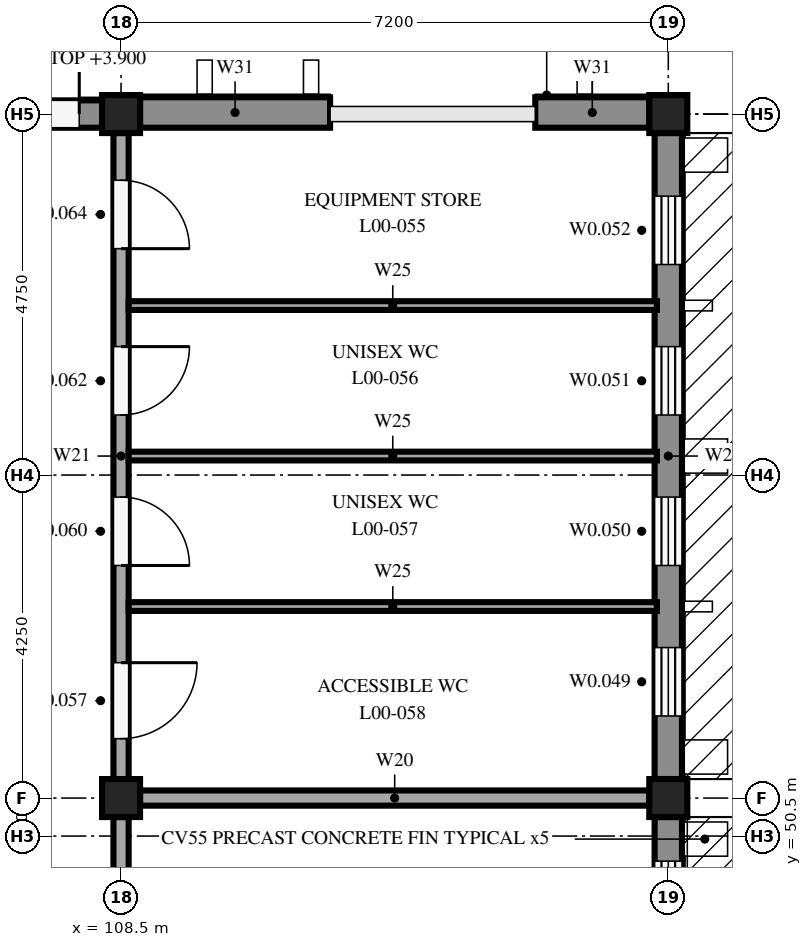
"""IFC4 building model, lengths in metres.
Left out: names, types, materials, properties, quantities, classifications, styles, units other than length and angle.
Written with IfcOpenShell. Run it as: python <this file> out.ifc"""

import sys

from ifc_helpers import new_model, si_unit, direction, frame, frame_2d, origin, origin_2d, place, context, subcontext, project, spatial, rectangle, extrude, element, fill, save


model = new_model("IFC4")
c1 = context("Model", 3, precision=1e-05, world=origin(), true_north=direction((0.0, 1.0)))
c2 = subcontext(c1, "Body", "Model", "MODEL_VIEW")
j1 = project(units=[si_unit("LENGTHUNIT", "METRE"), si_unit("PLANEANGLEUNIT", "RADIAN")], contexts=[c1])
p1 = place(None, origin())
s1 = spatial("IfcSite", under=j1, at=p1, CompositionType="ELEMENT")
p2 = place(p1, origin())
s2 = spatial("IfcBuilding", under=s1, at=p2, CompositionType="ELEMENT")
p3 = place(p2, origin())
s3 = spatial("IfcBuildingStorey", under=s2, at=p3, CompositionType="ELEMENT", Elevation=0.0)
for number, where, z_axis, x_axis in (
    (1, (108.5, 51.0, 0.0), (0.0, 0.0, 1.0), (1.0, 0.0, 0.0)),
    (2, (108.5, 60.0, 0.0), (0.0, 0.0, 1.0), (1.0, 0.0, 0.0)),
    (3, (115.7, 51.0, 0.0), (0.0, 0.0, 1.0), (1.0, 0.0, 0.0)),
    (4, (115.7, 60.0, 0.0), (0.0, 0.0, 1.0), (1.0, 0.0, 0.0)),
):
    element("IfcColumn", number, at=place(p3, frame(where, z_axis=z_axis, x_axis=x_axis)), inside=s3, PredefinedType="COLUMN", context=c2, shape_type="SweptSolid", body=[
        extrude(rectangle(XDim=0.5, YDim=0.5, at=origin_2d()), origin(), (0.0, 0.0, 1.0), 4.25),
    ])
p4 = place(p3, frame((115.7, 50.75, 0.0), z_axis=(0.0, 0.0, 1.0), x_axis=(0.0, -1.0, 0.0)))
e5 = element("IfcWall", 5, at=p4, inside=s3, PredefinedType="STANDARD", context=c2, shape_type="SweptSolid", body=[
    extrude(rectangle(XDim=8.5, YDim=0.36, at=frame_2d((4.25, 0.0))), origin(), (0.0, 0.0, 1.0), 3.75),
])
p5 = place(p4, frame((6.52, 0.0, 0.6)))
e6 = element("IfcOpeningElement", 6, at=p5, cuts=e5, PredefinedType="OPENING", context=c2, shape_type="SweptSolid", body=[
    extrude(rectangle(XDim=1.4, YDim=3.0, at=frame_2d((0.7, 1.5))), frame((0.0, 0.19, 0.0), z_axis=(0.0, -1.0, 0.0), x_axis=(1.0, 0.0, 0.0)), (0.0, 0.0, 1.0), 0.38),
])
p6 = place(p4, frame((4.54, 0.0, 0.6)))
e7 = element("IfcOpeningElement", 7, at=p6, cuts=e5, PredefinedType="OPENING", context=c2, shape_type="SweptSolid", body=[
    extrude(rectangle(XDim=1.4, YDim=3.0, at=frame_2d((0.7, 1.5))), frame((0.0, 0.19, 0.0), z_axis=(0.0, -1.0, 0.0), x_axis=(1.0, 0.0, 0.0)), (0.0, 0.0, 1.0), 0.38),
])
p7 = place(p4, frame((2.56, 0.0, 0.6)))
e8 = element("IfcOpeningElement", 8, at=p7, cuts=e5, PredefinedType="OPENING", context=c2, shape_type="SweptSolid", body=[
    extrude(rectangle(XDim=1.4, YDim=3.0, at=frame_2d((0.7, 1.5))), frame((0.0, 0.19, 0.0), z_axis=(0.0, -1.0, 0.0), x_axis=(1.0, 0.0, 0.0)), (0.0, 0.0, 1.0), 0.38),
])
p8 = place(p4, frame((0.58, 0.0, 0.6)))
e9 = element("IfcOpeningElement", 9, at=p8, cuts=e5, PredefinedType="OPENING", context=c2, shape_type="SweptSolid", body=[
    extrude(rectangle(XDim=1.4, YDim=3.0, at=frame_2d((0.7, 1.5))), frame((0.0, 0.19, 0.0), z_axis=(0.0, -1.0, 0.0), x_axis=(1.0, 0.0, 0.0)), (0.0, 0.0, 1.0), 0.38),
])
p9 = place(p3, frame((115.7, 59.75, 0.0), z_axis=(0.0, 0.0, 1.0), x_axis=(0.0, -1.0, 0.0)))
e10 = element("IfcWall", 10, at=p9, inside=s3, PredefinedType="STANDARD", context=c2, shape_type="SweptSolid", body=[
    extrude(rectangle(XDim=8.5, YDim=0.36, at=frame_2d((4.25, 0.0))), origin(), (0.0, 0.0, 1.0), 3.75),
])
p10 = place(p9, frame((6.77, 0.0, 1.6)))
e11 = element("IfcOpeningElement", 11, at=p10, cuts=e10, PredefinedType="OPENING", context=c2, shape_type="SweptSolid", body=[
    extrude(rectangle(XDim=0.9, YDim=1.0, at=frame_2d((0.45, 0.5))), frame((0.0, 0.19, 0.0), z_axis=(0.0, -1.0, 0.0), x_axis=(1.0, 0.0, 0.0)), (0.0, 0.0, 1.0), 0.38),
])
p11 = place(p9, frame((4.79, 0.0, 1.6)))
e12 = element("IfcOpeningElement", 12, at=p11, cuts=e10, PredefinedType="OPENING", context=c2, shape_type="SweptSolid", body=[
    extrude(rectangle(XDim=0.9, YDim=1.0, at=frame_2d((0.45, 0.5))), frame((0.0, 0.19, 0.0), z_axis=(0.0, -1.0, 0.0), x_axis=(1.0, 0.0, 0.0)), (0.0, 0.0, 1.0), 0.38),
])
p12 = place(p9, frame((2.81, 0.0, 1.6)))
e13 = element("IfcOpeningElement", 13, at=p12, cuts=e10, PredefinedType="OPENING", context=c2, shape_type="SweptSolid", body=[
    extrude(rectangle(XDim=0.9, YDim=1.0, at=frame_2d((0.45, 0.5))), frame((0.0, 0.19, 0.0), z_axis=(0.0, -1.0, 0.0), x_axis=(1.0, 0.0, 0.0)), (0.0, 0.0, 1.0), 0.38),
])
p13 = place(p9, frame((0.83, 0.0, 1.6)))
e14 = element("IfcOpeningElement", 14, at=p13, cuts=e10, PredefinedType="OPENING", context=c2, shape_type="SweptSolid", body=[
    extrude(rectangle(XDim=0.9, YDim=1.0, at=frame_2d((0.45, 0.5))), frame((0.0, 0.19, 0.0), z_axis=(0.0, -1.0, 0.0), x_axis=(1.0, 0.0, 0.0)), (0.0, 0.0, 1.0), 0.38),
])
p14 = place(p3, frame((106.05, 60.0, 0.0), z_axis=(0.0, 0.0, 1.0), x_axis=(1.0, 0.0, 0.0)))
e15 = element("IfcWall", 15, at=p14, inside=s3, PredefinedType="STANDARD", context=c2, shape_type="SweptSolid", body=[
    extrude(rectangle(XDim=2.2, YDim=0.36, at=frame_2d((1.1, 0.0))), origin(), (0.0, 0.0, 1.0), 3.9),
])
p15 = place(p14, frame((0.3, 0.0, 0.0)))
e16 = element("IfcOpeningElement", 16, at=p15, cuts=e15, PredefinedType="OPENING", context=c2, shape_type="SweptSolid", body=[
    extrude(rectangle(XDim=1.6, YDim=2.1, at=frame_2d((0.8, 1.05))), frame((0.0, 0.19, 0.0), z_axis=(0.0, -1.0, 0.0), x_axis=(1.0, 0.0, 0.0)), (0.0, 0.0, 1.0), 0.38),
])
p16 = place(p3, frame((108.75, 60.02, 0.0), z_axis=(0.0, 0.0, 1.0), x_axis=(1.0, 0.0, 0.0)))
e17 = element("IfcWall", 17, at=p16, inside=s3, PredefinedType="STANDARD", context=c2, shape_type="SweptSolid", body=[
    extrude(rectangle(XDim=2.5, YDim=0.4, at=frame_2d((1.25, 0.0))), origin(), (0.0, 0.0, 1.0), 3.8),
])
p17 = place(p3, frame((113.95, 60.02, 0.0), z_axis=(0.0, 0.0, 1.0), x_axis=(1.0, 0.0, 0.0)))
e18 = element("IfcWall", 18, at=p17, inside=s3, PredefinedType="STANDARD", context=c2, shape_type="SweptSolid", body=[
    extrude(rectangle(XDim=1.5, YDim=0.4, at=frame_2d((0.75, 0.0))), origin(), (0.0, 0.0, 1.0), 3.8),
])
p18 = place(p3, frame((108.5, 59.75, 0.0), z_axis=(0.0, 0.0, 1.0), x_axis=(0.0, -1.0, 0.0)))
e19 = element("IfcWall", 19, at=p18, inside=s3, PredefinedType="PARTITIONING", context=c2, shape_type="SweptSolid", body=[
    extrude(rectangle(XDim=8.5, YDim=0.2, at=frame_2d((4.25, 0.0))), origin(), (0.0, 0.0, 1.0), 3.8),
])
p19 = place(p18, frame((6.969, 0.0, 0.0)))
e20 = element("IfcOpeningElement", 20, at=p19, cuts=e19, PredefinedType="OPENING", context=c2, shape_type="SweptSolid", body=[
    extrude(rectangle(XDim=1.0, YDim=2.1, at=frame_2d((0.5, 1.05))), frame((0.0, 0.11, 0.0), z_axis=(0.0, -1.0, 0.0), x_axis=(1.0, 0.0, 0.0)), (0.0, 0.0, 1.0), 0.22),
])
p20 = place(p18, frame((4.79, 0.0, 0.0)))
e21 = element("IfcOpeningElement", 21, at=p20, cuts=e19, PredefinedType="OPENING", context=c2, shape_type="SweptSolid", body=[
    extrude(rectangle(XDim=0.9, YDim=2.1, at=frame_2d((0.45, 1.05))), frame((0.0, 0.11, 0.0), z_axis=(0.0, -1.0, 0.0), x_axis=(1.0, 0.0, 0.0)), (0.0, 0.0, 1.0), 0.22),
])
p21 = place(p18, frame((2.81, 0.0, 0.0)))
e22 = element("IfcOpeningElement", 22, at=p21, cuts=e19, PredefinedType="OPENING", context=c2, shape_type="SweptSolid", body=[
    extrude(rectangle(XDim=0.9, YDim=2.1, at=frame_2d((0.45, 1.05))), frame((0.0, 0.11, 0.0), z_axis=(0.0, -1.0, 0.0), x_axis=(1.0, 0.0, 0.0)), (0.0, 0.0, 1.0), 0.22),
])
p22 = place(p18, frame((0.621, 0.0, 0.0)))
e23 = element("IfcOpeningElement", 23, at=p22, cuts=e19, PredefinedType="OPENING", context=c2, shape_type="SweptSolid", body=[
    extrude(rectangle(XDim=0.9, YDim=2.1, at=frame_2d((0.45, 1.05))), frame((0.0, 0.11, 0.0), z_axis=(0.0, -1.0, 0.0), x_axis=(1.0, 0.0, 0.0)), (0.0, 0.0, 1.0), 0.22),
])
p23 = place(p3, frame((108.75, 51.0, 0.0), z_axis=(0.0, 0.0, 1.0), x_axis=(1.0, 0.0, 0.0)))
e24 = element("IfcWall", 24, at=p23, inside=s3, PredefinedType="PARTITIONING", context=c2, shape_type="SweptSolid", body=[
    extrude(rectangle(XDim=6.7, YDim=0.2, at=frame_2d((3.35, 0.0))), origin(), (0.0, 0.0, 1.0), 3.8),
])
for number, where, z_axis, x_axis in (
    (25, (108.6, 57.48, 0.0), (0.0, 0.0, 1.0), (1.0, 0.0, 0.0)),
    (26, (108.6, 55.5, 0.0), (0.0, 0.0, 1.0), (1.0, 0.0, 0.0)),
    (27, (108.6, 53.52, 0.0), (0.0, 0.0, 1.0), (1.0, 0.0, 0.0)),
):
    element("IfcWall", number, at=place(p3, frame(where, z_axis=z_axis, x_axis=x_axis)), inside=s3, PredefinedType="PARTITIONING", context=c2, shape_type="SweptSolid", body=[
        extrude(rectangle(XDim=6.95, YDim=0.115, at=frame_2d((3.475, 0.0))), origin(), (0.0, 0.0, 1.0), 4.25),
    ])
p24 = place(p3, frame((108.5, 50.75, 0.0), z_axis=(0.0, 0.0, 1.0), x_axis=(0.0, -1.0, 0.0)))
e28 = element("IfcWall", 28, at=p24, inside=s3, PredefinedType="PARTITIONING", context=c2, shape_type="SweptSolid", body=[
    extrude(rectangle(XDim=8.5, YDim=0.2, at=frame_2d((4.25, 0.0))), origin(), (0.0, 0.0, 1.0), 3.8),
])
p25 = place(p24, frame((3.75, 0.0, 0.0)))
e29 = element("IfcOpeningElement", 29, at=p25, cuts=e28, PredefinedType="OPENING", context=c2, shape_type="SweptSolid", body=[
    extrude(rectangle(XDim=1.0, YDim=2.1, at=frame_2d((0.5, 1.05))), frame((0.0, 0.11, 0.0), z_axis=(0.0, -1.0, 0.0), x_axis=(1.0, 0.0, 0.0)), (0.0, 0.0, 1.0), 0.22),
])
p26 = place(p8, origin())
e30 = element("IfcWindow", 30, at=p26, inside=s3, PartitioningType="DOUBLE_PANEL_VERTICAL", PredefinedType="WINDOW", context=c2, shape_type="SweptSolid", body=[
    extrude(rectangle(XDim=1.4, YDim=3.0, at=frame_2d((0.7, 1.5))), frame((0.0, 0.03, 0.0), z_axis=(0.0, -1.0, 0.0), x_axis=(1.0, 0.0, 0.0)), (0.0, 0.0, 1.0), 0.06),
])
fill(e9, e30)
p27 = place(p10, origin())
e31 = element("IfcWindow", 31, at=p27, inside=s3, PartitioningType="SINGLE_PANEL", PredefinedType="WINDOW", context=c2, shape_type="SweptSolid", body=[
    extrude(rectangle(XDim=0.9, YDim=1.0, at=frame_2d((0.45, 0.5))), frame((0.0, 0.03, 0.0), z_axis=(0.0, -1.0, 0.0), x_axis=(1.0, 0.0, 0.0)), (0.0, 0.0, 1.0), 0.06),
])
fill(e11, e31)
p28 = place(p11, origin())
e32 = element("IfcWindow", 32, at=p28, inside=s3, PartitioningType="SINGLE_PANEL", PredefinedType="WINDOW", context=c2, shape_type="SweptSolid", body=[
    extrude(rectangle(XDim=0.9, YDim=1.0, at=frame_2d((0.45, 0.5))), frame((0.0, 0.03, 0.0), z_axis=(0.0, -1.0, 0.0), x_axis=(1.0, 0.0, 0.0)), (0.0, 0.0, 1.0), 0.06),
])
fill(e12, e32)
p29 = place(p12, origin())
e33 = element("IfcWindow", 33, at=p29, inside=s3, PartitioningType="SINGLE_PANEL", PredefinedType="WINDOW", context=c2, shape_type="SweptSolid", body=[
    extrude(rectangle(XDim=0.9, YDim=1.0, at=frame_2d((0.45, 0.5))), frame((0.0, 0.03, 0.0), z_axis=(0.0, -1.0, 0.0), x_axis=(1.0, 0.0, 0.0)), (0.0, 0.0, 1.0), 0.06),
])
fill(e13, e33)
p30 = place(p13, origin())
e34 = element("IfcWindow", 34, at=p30, inside=s3, PartitioningType="SINGLE_PANEL", PredefinedType="WINDOW", context=c2, shape_type="SweptSolid", body=[
    extrude(rectangle(XDim=0.9, YDim=1.0, at=frame_2d((0.45, 0.5))), frame((0.0, 0.03, 0.0), z_axis=(0.0, -1.0, 0.0), x_axis=(1.0, 0.0, 0.0)), (0.0, 0.0, 1.0), 0.06),
])
fill(e14, e34)
p31 = place(p15, origin())
e35 = element("IfcDoor", 35, at=p31, inside=s3, OperationType="DOUBLE_DOOR_SINGLE_SWING", PredefinedType="DOOR", context=c2, shape_type="SweptSolid", body=[
    extrude(rectangle(XDim=1.6, YDim=2.1, at=frame_2d((0.8, 1.05))), frame((0.0, 0.025, 0.0), z_axis=(0.0, -1.0, 0.0), x_axis=(1.0, 0.0, 0.0)), (0.0, 0.0, 1.0), 0.05),
])
fill(e16, e35)
p32 = place(p19, origin())
e36 = element("IfcDoor", 36, at=p32, inside=s3, OperationType="SINGLE_SWING_LEFT", PredefinedType="DOOR", context=c2, shape_type="SweptSolid", body=[
    extrude(rectangle(XDim=1.0, YDim=2.1, at=frame_2d((0.5, 1.05))), frame((0.0, 0.025, 0.0), z_axis=(0.0, -1.0, 0.0), x_axis=(1.0, 0.0, 0.0)), (0.0, 0.0, 1.0), 0.05),
])
fill(e20, e36)
p33 = place(p20, origin())
e37 = element("IfcDoor", 37, at=p33, inside=s3, OperationType="SINGLE_SWING_RIGHT", PredefinedType="DOOR", context=c2, shape_type="SweptSolid", body=[
    extrude(rectangle(XDim=0.9, YDim=2.1, at=frame_2d((0.45, 1.05))), frame((0.0, 0.025, 0.0), z_axis=(0.0, -1.0, 0.0), x_axis=(1.0, 0.0, 0.0)), (0.0, 0.0, 1.0), 0.05),
])
fill(e21, e37)
p34 = place(p21, origin())
e38 = element("IfcDoor", 38, at=p34, inside=s3, OperationType="SINGLE_SWING_LEFT", PredefinedType="DOOR", context=c2, shape_type="SweptSolid", body=[
    extrude(rectangle(XDim=0.9, YDim=2.1, at=frame_2d((0.45, 1.05))), frame((0.0, 0.025, 0.0), z_axis=(0.0, -1.0, 0.0), x_axis=(1.0, 0.0, 0.0)), (0.0, 0.0, 1.0), 0.05),
])
fill(e22, e38)
p35 = place(p22, origin())
e39 = element("IfcDoor", 39, at=p35, inside=s3, OperationType="SINGLE_SWING_RIGHT", PredefinedType="DOOR", context=c2, shape_type="SweptSolid", body=[
    extrude(rectangle(XDim=0.9, YDim=2.1, at=frame_2d((0.45, 1.05))), frame((0.0, 0.025, 0.0), z_axis=(0.0, -1.0, 0.0), x_axis=(1.0, 0.0, 0.0)), (0.0, 0.0, 1.0), 0.05),
])
fill(e23, e39)
save(model, sys.argv[1])
